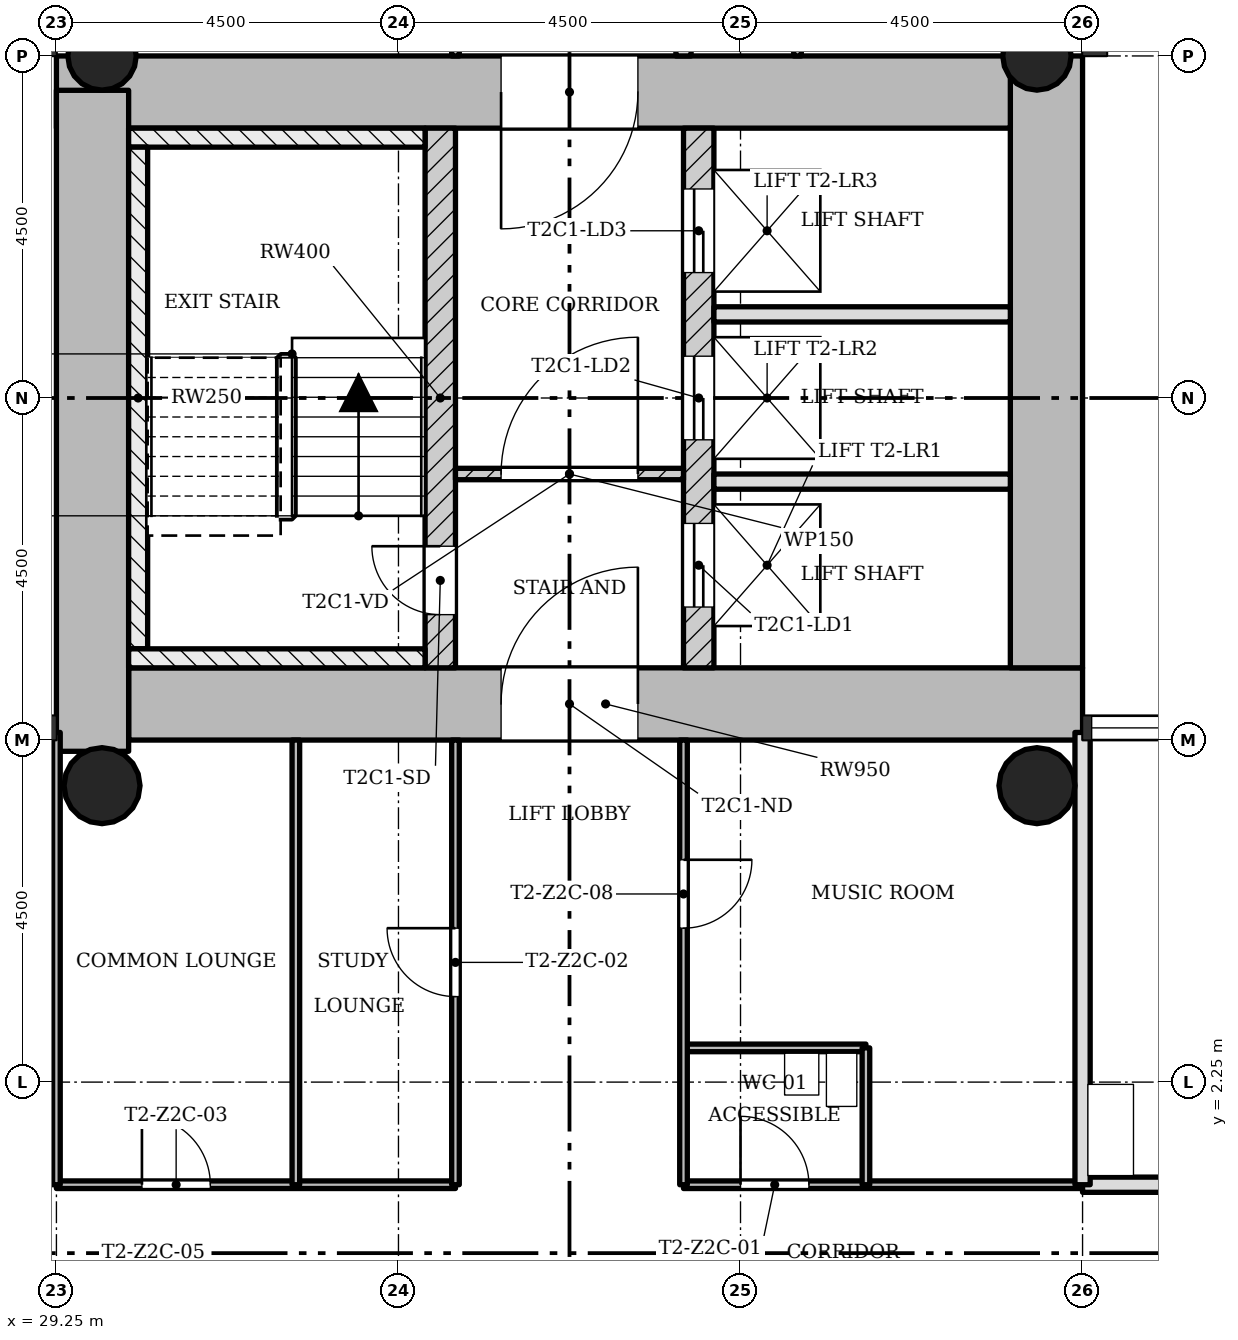
"""IFC4 building model, lengths in metres.
Left out: names, types, materials, properties, quantities, classifications, styles, units other than length and angle.
Written with IfcOpenShell. Run it as: python <this file> out.ifc"""

import sys

from ifc_helpers import new_model, si_unit, direction, frame, frame_2d, origin, origin_2d, place, context, subcontext, project, spatial, rectangle, hollow_circle, extrude, element, fill, save


model = new_model("IFC4")
c1 = context("Model", 3, precision=1e-05, world=origin(), true_north=direction((0.0, 1.0)))
c2 = subcontext(c1, "Body", "Model", "MODEL_VIEW")
j1 = project(units=[si_unit("LENGTHUNIT", "METRE"), si_unit("PLANEANGLEUNIT", "RADIAN")], contexts=[c1])
p1 = place(None, origin())
s1 = spatial("IfcSite", under=j1, at=p1, CompositionType="ELEMENT")
p2 = place(p1, origin())
s2 = spatial("IfcBuilding", under=s1, at=p2, CompositionType="ELEMENT")
p3 = place(p2, frame((0.0, 0.0, 93.6)))
s3 = spatial("IfcBuildingStorey", under=s2, at=p3, CompositionType="ELEMENT", Elevation=93.6)
p4 = place(p3, frame((30.2, 7.225, 0.0), z_axis=(0.0, 0.0, 1.0), x_axis=(1.0, 0.0, 0.0)))
e1 = element("IfcWall", 1, at=p4, inside=s3, PredefinedType="SHEAR", context=c2, shape_type="SweptSolid", body=[
    extrude(rectangle(XDim=12.55, YDim=0.95, at=frame_2d((6.275, 0.0))), origin(), (0.0, 0.0, 1.0), 3.4),
])
p5 = place(p4, frame((4.9, 0.0, 0.0)))
e2 = element("IfcOpeningElement", 2, at=p5, cuts=e1, PredefinedType="OPENING", context=c2, shape_type="SweptSolid", body=[
    extrude(rectangle(XDim=1.8, YDim=2.1, at=frame_2d((0.9, 1.05))), frame((0.0, 0.485, 0.0), z_axis=(0.0, -1.0, 0.0), x_axis=(1.0, 0.0, 0.0)), (0.0, 0.0, 1.0), 0.97),
])
p6 = place(p3, frame((42.275, 7.7, 0.0), z_axis=(0.0, 0.0, 1.0), x_axis=(0.0, 1.0, 0.0)))
e3 = element("IfcWall", 3, at=p6, inside=s3, PredefinedType="SHEAR", context=c2, shape_type="SweptSolid", body=[
    extrude(rectangle(XDim=8.05, YDim=0.95, at=frame_2d((4.025, 0.0))), origin(), (0.0, 0.0, 1.0), 3.4),
])
p7 = place(p3, frame((41.8, 15.275, 0.0), z_axis=(0.0, 0.0, 1.0), x_axis=(-1.0, 0.0, 0.0)))
e4 = element("IfcWall", 4, at=p7, inside=s3, PredefinedType="SHEAR", context=c2, shape_type="SweptSolid", body=[
    extrude(rectangle(XDim=12.55, YDim=0.95, at=frame_2d((6.275, 0.0))), origin(), (0.0, 0.0, 1.0), 3.4),
])
p8 = place(p7, frame((4.9, 0.0, 0.0)))
e5 = element("IfcOpeningElement", 5, at=p8, cuts=e4, PredefinedType="OPENING", context=c2, shape_type="SweptSolid", body=[
    extrude(rectangle(XDim=1.8, YDim=2.1, at=frame_2d((0.9, 1.05))), frame((0.0, 0.485, 0.0), z_axis=(0.0, -1.0, 0.0), x_axis=(1.0, 0.0, 0.0)), (0.0, 0.0, 1.0), 0.97),
])
p9 = place(p3, frame((29.725, 15.298, 0.0), z_axis=(0.0, 0.0, 1.0), x_axis=(0.0, -1.0, 0.0)))
e6 = element("IfcWall", 6, at=p9, inside=s3, PredefinedType="SHEAR", context=c2, shape_type="SweptSolid", body=[
    extrude(rectangle(XDim=8.696, YDim=0.95, at=frame_2d((4.348, 0.0))), origin(), (0.0, 0.0, 1.0), 3.4),
])
p10 = place(p3, frame((34.3, 7.7, 0.0), z_axis=(0.0, 0.0, 1.0), x_axis=(0.0, 1.0, 0.0)))
e7 = element("IfcWall", 7, at=p10, inside=s3, PredefinedType="SHEAR", context=c2, shape_type="SweptSolid", body=[
    extrude(rectangle(XDim=7.1, YDim=0.4, at=frame_2d((3.55, 0.0))), origin(), (0.0, 0.0, 1.0), 3.4),
])
p11 = place(p10, frame((0.7, 0.0, 0.0)))
e8 = element("IfcOpeningElement", 8, at=p11, cuts=e7, PredefinedType="OPENING", context=c2, shape_type="SweptSolid", body=[
    extrude(rectangle(XDim=0.9, YDim=2.1, at=frame_2d((0.45, 1.05))), frame((0.0, 0.21, 0.0), z_axis=(0.0, -1.0, 0.0), x_axis=(1.0, 0.0, 0.0)), (0.0, 0.0, 1.0), 0.42),
])
p12 = place(p3, frame((37.7, 7.7, 0.0), z_axis=(0.0, 0.0, 1.0), x_axis=(0.0, 1.0, 0.0)))
e9 = element("IfcWall", 9, at=p12, inside=s3, PredefinedType="SHEAR", context=c2, shape_type="SweptSolid", body=[
    extrude(rectangle(XDim=7.1, YDim=0.4, at=frame_2d((3.55, 0.0))), origin(), (0.0, 0.0, 1.0), 3.4),
])
p13 = place(p12, frame((0.8, 0.0, 0.0)))
e10 = element("IfcOpeningElement", 10, at=p13, cuts=e9, PredefinedType="OPENING", context=c2, shape_type="SweptSolid", body=[
    extrude(rectangle(XDim=1.1, YDim=2.1, at=frame_2d((0.55, 1.05))), frame((0.0, 0.21, 0.0), z_axis=(0.0, -1.0, 0.0), x_axis=(1.0, 0.0, 0.0)), (0.0, 0.0, 1.0), 0.42),
])
p14 = place(p12, frame((3.0, 0.0, 0.0)))
e11 = element("IfcOpeningElement", 11, at=p14, cuts=e9, PredefinedType="OPENING", context=c2, shape_type="SweptSolid", body=[
    extrude(rectangle(XDim=1.1, YDim=2.1, at=frame_2d((0.55, 1.05))), frame((0.0, 0.21, 0.0), z_axis=(0.0, -1.0, 0.0), x_axis=(1.0, 0.0, 0.0)), (0.0, 0.0, 1.0), 0.42),
])
p15 = place(p12, frame((5.2, 0.0, 0.0)))
e12 = element("IfcOpeningElement", 12, at=p15, cuts=e9, PredefinedType="OPENING", context=c2, shape_type="SweptSolid", body=[
    extrude(rectangle(XDim=1.1, YDim=2.1, at=frame_2d((0.55, 1.05))), frame((0.0, 0.21, 0.0), z_axis=(0.0, -1.0, 0.0), x_axis=(1.0, 0.0, 0.0)), (0.0, 0.0, 1.0), 0.42),
])
for number, where, z_axis, x_axis in (
    (13, (42.15, 15.75, 0.0), (0.0, 0.0, 1.0), (1.0, 0.0, 0.0)),
    (14, (29.85, 15.75, 0.0), (0.0, 0.0, 1.0), (1.0, 0.0, 0.0)),
):
    element("IfcColumn", number, at=place(p3, frame(where, z_axis=z_axis, x_axis=x_axis)), inside=s3, PredefinedType="COLUMN", context=c2, shape_type="SweptSolid", body=[
        extrude(hollow_circle(Radius=0.45, WallThickness=0.032, at=origin_2d()), origin(), (0.0, 0.0, 1.0), 3.4),
    ])
for number, where, z_axis, x_axis in (
    (15, (42.15, 6.15, 0.0), (0.0, 0.0, 1.0), (1.0, 0.0, 0.0)),
    (16, (29.85, 6.15, 0.0), (0.0, 0.0, 1.0), (1.0, 0.0, 0.0)),
):
    element("IfcColumn", number, at=place(p3, frame(where, z_axis=z_axis, x_axis=x_axis)), inside=s3, PredefinedType="COLUMN", context=c2, shape_type="SweptSolid", body=[
        extrude(hollow_circle(Radius=0.5, WallThickness=0.036, at=origin_2d()), origin(), (0.0, 0.0, 1.0), 3.4),
    ])
p16 = place(p3, frame((37.5, 10.25, 0.0), z_axis=(0.0, 0.0, 1.0), x_axis=(-1.0, 0.0, 0.0)))
e17 = element("IfcWall", 17, at=p16, inside=s3, PredefinedType="PARTITIONING", context=c2, shape_type="SweptSolid", body=[
    extrude(rectangle(XDim=3.0, YDim=0.15, at=frame_2d((1.5, 0.0))), origin(), (0.0, 0.0, 1.0), 3.0),
])
p17 = place(p16, frame((0.6, 0.0, 0.0)))
e18 = element("IfcOpeningElement", 18, at=p17, cuts=e17, PredefinedType="OPENING", context=c2, shape_type="SweptSolid", body=[
    extrude(rectangle(XDim=1.8, YDim=2.1, at=frame_2d((0.9, 1.05))), frame((0.0, 0.085, 0.0), z_axis=(0.0, -1.0, 0.0), x_axis=(1.0, 0.0, 0.0)), (0.0, 0.0, 1.0), 0.17),
])
for number, where, z_axis, x_axis in (
    (19, (41.8, 10.15, 0.0), (0.0, 0.0, 1.0), (-1.0, 0.0, 0.0)),
    (20, (41.8, 12.35, 0.0), (0.0, 0.0, 1.0), (-1.0, 0.0, 0.0)),
):
    element("IfcWall", number, at=place(p3, frame(where, z_axis=z_axis, x_axis=x_axis)), inside=s3, PredefinedType="SOLIDWALL", context=c2, shape_type="SweptSolid", body=[
        extrude(rectangle(XDim=3.9, YDim=0.2, at=frame_2d((1.95, 0.0))), origin(), (0.0, 0.0, 1.0), 3.0),
    ])
p18 = place(p3, frame((42.75, 0.9, 0.0), z_axis=(0.0, 0.0, 1.0), x_axis=(-1.0, 0.0, 0.0)))
e21 = element("IfcWall", 21, at=p18, inside=s3, PredefinedType="PARTITIONING", context=c2, shape_type="SweptSolid", body=[
    extrude(rectangle(XDim=5.25, YDim=0.1, at=frame_2d((2.625, 0.0))), origin(), (0.0, 0.0, 1.0), 3.0),
])
p19 = place(p18, frame((3.6, 0.0, 0.0)))
e22 = element("IfcOpeningElement", 22, at=p19, cuts=e21, PredefinedType="OPENING", context=c2, shape_type="SweptSolid", body=[
    extrude(rectangle(XDim=0.9, YDim=2.1, at=frame_2d((0.45, 1.05))), frame((0.0, 0.06, 0.0), z_axis=(0.0, -1.0, 0.0), x_axis=(1.0, 0.0, 0.0)), (0.0, 0.0, 1.0), 0.12),
])
p20 = place(p3, frame((34.5, 0.9, 0.0), z_axis=(0.0, 0.0, 1.0), x_axis=(-1.0, 0.0, 0.0)))
e23 = element("IfcWall", 23, at=p20, inside=s3, PredefinedType="PARTITIONING", context=c2, shape_type="SweptSolid", body=[
    extrude(rectangle(XDim=5.25, YDim=0.1, at=frame_2d((2.625, 0.0))), origin(), (0.0, 0.0, 1.0), 3.0),
])
p21 = place(p20, frame((3.225, 0.0, 0.0)))
e24 = element("IfcOpeningElement", 24, at=p21, cuts=e23, PredefinedType="OPENING", context=c2, shape_type="SweptSolid", body=[
    extrude(rectangle(XDim=0.9, YDim=2.1, at=frame_2d((0.45, 1.05))), frame((0.0, 0.06, 0.0), z_axis=(0.0, -1.0, 0.0), x_axis=(1.0, 0.0, 0.0)), (0.0, 0.0, 1.0), 0.12),
])
p22 = place(p3, frame((51.75, 0.9, 0.0), z_axis=(0.0, 0.0, 1.0), x_axis=(-1.0, 0.0, 0.0)))
e25 = element("IfcWall", 25, at=p22, inside=s3, PredefinedType="SOLIDWALL", context=c2, shape_type="SweptSolid", body=[
    extrude(rectangle(XDim=9.0, YDim=0.2, at=frame_2d((4.5, 0.0))), origin(), (0.0, 0.0, 1.0), 3.0),
])
p23 = place(p22, frame((1.95, 0.0, 0.0)))
e26 = element("IfcOpeningElement", 26, at=p23, cuts=e25, PredefinedType="OPENING", context=c2, shape_type="SweptSolid", body=[
    extrude(rectangle(XDim=0.9, YDim=2.1, at=frame_2d((0.45, 1.05))), frame((0.0, 0.11, 0.0), z_axis=(0.0, -1.0, 0.0), x_axis=(1.0, 0.0, 0.0)), (0.0, 0.0, 1.0), 0.22),
])
p24 = place(p3, frame((39.9, 2.7, 0.0), z_axis=(0.0, 0.0, 1.0), x_axis=(-1.0, 0.0, 0.0)))
e27 = element("IfcWall", 27, at=p24, inside=s3, PredefinedType="PARTITIONING", context=c2, shape_type="SweptSolid", body=[
    extrude(rectangle(XDim=2.4, YDim=0.1, at=frame_2d((1.2, 0.0))), origin(), (0.0, 0.0, 1.0), 3.0),
])
p25 = place(p3, frame((29.25, 3.15, 0.0), z_axis=(0.0, 0.0, 1.0), x_axis=(-1.0, 0.0, 0.0)))
e28 = element("IfcWall", 28, at=p25, inside=s3, PredefinedType="PARTITIONING", context=c2, shape_type="SweptSolid", body=[
    extrude(rectangle(XDim=9.0, YDim=0.1, at=frame_2d((4.5, 0.0))), origin(), (0.0, 0.0, 1.0), 3.0),
])
p26 = place(p25, frame((2.55, 0.0, 0.0)))
e29 = element("IfcOpeningElement", 29, at=p26, cuts=e28, PredefinedType="OPENING", context=c2, shape_type="SweptSolid", body=[
    extrude(rectangle(XDim=0.9, YDim=2.1, at=frame_2d((0.45, 1.05))), frame((0.0, 0.06, 0.0), z_axis=(0.0, -1.0, 0.0), x_axis=(1.0, 0.0, 0.0)), (0.0, 0.0, 1.0), 0.12),
])
p27 = place(p3, frame((42.75, 0.9, 0.0), z_axis=(0.0, 0.0, 1.0), x_axis=(0.0, 1.0, 0.0)))
e30 = element("IfcWall", 30, at=p27, inside=s3, PredefinedType="SOLIDWALL", context=c2, shape_type="SweptSolid", body=[
    extrude(rectangle(XDim=5.95, YDim=0.2, at=frame_2d((2.975, 0.0))), origin(), (0.0, 0.0, 1.0), 3.0),
])
p28 = place(p3, frame((39.9, 0.9, 0.0), z_axis=(0.0, 0.0, 1.0), x_axis=(0.0, 1.0, 0.0)))
e31 = element("IfcWall", 31, at=p28, inside=s3, PredefinedType="PARTITIONING", context=c2, shape_type="SweptSolid", body=[
    extrude(rectangle(XDim=1.8, YDim=0.1, at=frame_2d((0.9, 0.0))), origin(), (0.0, 0.0, 1.0), 3.0),
])
p29 = place(p3, frame((39.0, 15.75, 0.0), z_axis=(0.0, 0.0, 1.0), x_axis=(0.0, 1.0, 0.0)))
e32 = element("IfcWall", 32, at=p29, inside=s3, PredefinedType="PARTITIONING", context=c2, shape_type="SweptSolid", body=[
    extrude(rectangle(XDim=2.4, YDim=0.1, at=frame_2d((1.2, 0.0))), origin(), (0.0, 0.0, 1.0), 3.0),
])
p30 = place(p29, frame((0.75, 0.0, 0.0)))
e33 = element("IfcOpeningElement", 33, at=p30, cuts=e32, PredefinedType="OPENING", context=c2, shape_type="SweptSolid", body=[
    extrude(rectangle(XDim=0.9, YDim=2.1, at=frame_2d((0.45, 1.05))), frame((0.0, 0.06, 0.0), z_axis=(0.0, -1.0, 0.0), x_axis=(1.0, 0.0, 0.0)), (0.0, 0.0, 1.0), 0.12),
])
p31 = place(p3, frame((37.5, 0.9, 0.0), z_axis=(0.0, 0.0, 1.0), x_axis=(0.0, 1.0, 0.0)))
e34 = element("IfcWall", 34, at=p31, inside=s3, PredefinedType="PARTITIONING", context=c2, shape_type="SweptSolid", body=[
    extrude(rectangle(XDim=5.85, YDim=0.1, at=frame_2d((2.925, 0.0))), origin(), (0.0, 0.0, 1.0), 3.0),
])
p32 = place(p31, frame((3.375, 0.0, 0.0)))
e35 = element("IfcOpeningElement", 35, at=p32, cuts=e34, PredefinedType="OPENING", context=c2, shape_type="SweptSolid", body=[
    extrude(rectangle(XDim=0.9, YDim=2.1, at=frame_2d((0.45, 1.05))), frame((0.0, 0.06, 0.0), z_axis=(0.0, -1.0, 0.0), x_axis=(1.0, 0.0, 0.0)), (0.0, 0.0, 1.0), 0.12),
])
p33 = place(p3, frame((37.5, 15.75, 0.0), z_axis=(0.0, 0.0, 1.0), x_axis=(0.0, 1.0, 0.0)))
e36 = element("IfcWall", 36, at=p33, inside=s3, PredefinedType="SOLIDWALL", context=c2, shape_type="SweptSolid", body=[
    extrude(rectangle(XDim=4.5, YDim=0.2, at=frame_2d((2.25, 0.0))), origin(), (0.0, 0.0, 1.0), 3.0),
])
p34 = place(p33, frame((3.0, 0.0, 0.0)))
e37 = element("IfcOpeningElement", 37, at=p34, cuts=e36, PredefinedType="OPENING", context=c2, shape_type="SweptSolid", body=[
    extrude(rectangle(XDim=0.9, YDim=2.1, at=frame_2d((0.45, 1.05))), frame((0.0, 0.11, 0.0), z_axis=(0.0, -1.0, 0.0), x_axis=(1.0, 0.0, 0.0)), (0.0, 0.0, 1.0), 0.22),
])
p35 = place(p3, frame((34.5, 0.9, 0.0), z_axis=(0.0, 0.0, 1.0), x_axis=(0.0, 1.0, 0.0)))
e38 = element("IfcWall", 38, at=p35, inside=s3, PredefinedType="PARTITIONING", context=c2, shape_type="SweptSolid", body=[
    extrude(rectangle(XDim=5.85, YDim=0.1, at=frame_2d((2.925, 0.0))), origin(), (0.0, 0.0, 1.0), 3.0),
])
p36 = place(p35, frame((2.475, 0.0, 0.0)))
e39 = element("IfcOpeningElement", 39, at=p36, cuts=e38, PredefinedType="OPENING", context=c2, shape_type="SweptSolid", body=[
    extrude(rectangle(XDim=0.9, YDim=2.1, at=frame_2d((0.45, 1.05))), frame((0.0, 0.06, 0.0), z_axis=(0.0, -1.0, 0.0), x_axis=(1.0, 0.0, 0.0)), (0.0, 0.0, 1.0), 0.12),
])
p37 = place(p3, frame((34.5, 15.75, 0.0), z_axis=(0.0, 0.0, 1.0), x_axis=(0.0, 1.0, 0.0)))
e40 = element("IfcWall", 40, at=p37, inside=s3, PredefinedType="PARTITIONING", context=c2, shape_type="SweptSolid", body=[
    extrude(rectangle(XDim=4.5, YDim=0.1, at=frame_2d((2.25, 0.0))), origin(), (0.0, 0.0, 1.0), 3.0),
])
p38 = place(p37, frame((1.8, 0.0, 0.0)))
e41 = element("IfcOpeningElement", 41, at=p38, cuts=e40, PredefinedType="OPENING", context=c2, shape_type="SweptSolid", body=[
    extrude(rectangle(XDim=0.9, YDim=2.1, at=frame_2d((0.45, 1.05))), frame((0.0, 0.06, 0.0), z_axis=(0.0, -1.0, 0.0), x_axis=(1.0, 0.0, 0.0)), (0.0, 0.0, 1.0), 0.12),
])
p39 = place(p3, frame((32.4, 0.9, 0.0), z_axis=(0.0, 0.0, 1.0), x_axis=(0.0, 1.0, 0.0)))
e42 = element("IfcWall", 42, at=p39, inside=s3, PredefinedType="PARTITIONING", context=c2, shape_type="SweptSolid", body=[
    extrude(rectangle(XDim=5.85, YDim=0.1, at=frame_2d((2.925, 0.0))), origin(), (0.0, 0.0, 1.0), 3.0),
])
p40 = place(p3, frame((29.25, 0.9, 0.0), z_axis=(0.0, 0.0, 1.0), x_axis=(0.0, 1.0, 0.0)))
e43 = element("IfcWall", 43, at=p40, inside=s3, PredefinedType="PARTITIONING", context=c2, shape_type="SweptSolid", body=[
    extrude(rectangle(XDim=5.95, YDim=0.1, at=frame_2d((2.975, 0.0))), origin(), (0.0, 0.0, 1.0), 3.0),
])
p41 = place(p3, frame((34.1, 14.675, 0.0), z_axis=(0.0, 0.0, 1.0), x_axis=(-1.0, 0.0, 0.0)))
e44 = element("IfcWall", 44, at=p41, inside=s3, PredefinedType="SHEAR", context=c2, shape_type="SweptSolid", body=[
    extrude(rectangle(XDim=3.9, YDim=0.25, at=frame_2d((1.95, 0.0))), origin(), (0.0, 0.0, 1.0), 3.4),
])
p42 = place(p3, frame((30.325, 7.95, 0.0), z_axis=(0.0, 0.0, 1.0), x_axis=(0.0, 1.0, 0.0)))
e45 = element("IfcWall", 45, at=p42, inside=s3, PredefinedType="SHEAR", context=c2, shape_type="SweptSolid", body=[
    extrude(rectangle(XDim=6.6, YDim=0.25, at=frame_2d((3.3, 0.0))), origin(), (0.0, 0.0, 1.0), 3.4),
])
p43 = place(p3, frame((34.1, 7.825, 0.0), z_axis=(0.0, 0.0, 1.0), x_axis=(-1.0, 0.0, 0.0)))
e46 = element("IfcWall", 46, at=p43, inside=s3, PredefinedType="SHEAR", context=c2, shape_type="SweptSolid", body=[
    extrude(rectangle(XDim=3.9, YDim=0.25, at=frame_2d((1.95, 0.0))), origin(), (0.0, 0.0, 1.0), 3.4),
])
p44 = place(p17, origin())
e47 = element("IfcDoor", 47, at=p44, inside=s3, OperationType="SINGLE_SWING_LEFT", PredefinedType="DOOR", context=c2, shape_type="SweptSolid", body=[
    extrude(rectangle(XDim=1.8, YDim=2.1, at=frame_2d((0.9, 1.05))), frame((0.0, 0.025, 0.0), z_axis=(0.0, -1.0, 0.0), x_axis=(1.0, 0.0, 0.0)), (0.0, 0.0, 1.0), 0.05),
])
fill(e18, e47)
p45 = place(p19, origin())
e48 = element("IfcDoor", 48, at=p45, inside=s3, OperationType="SINGLE_SWING_RIGHT", PredefinedType="DOOR", context=c2, shape_type="SweptSolid", body=[
    extrude(rectangle(XDim=0.9, YDim=2.1, at=frame_2d((0.45, 1.05))), frame((0.0, 0.025, 0.0), z_axis=(0.0, -1.0, 0.0), x_axis=(1.0, 0.0, 0.0)), (0.0, 0.0, 1.0), 0.05),
])
fill(e22, e48)
p46 = place(p36, origin())
e49 = element("IfcDoor", 49, at=p46, inside=s3, OperationType="SINGLE_SWING_LEFT", PredefinedType="DOOR", context=c2, shape_type="SweptSolid", body=[
    extrude(rectangle(XDim=0.9, YDim=2.1, at=frame_2d((0.45, 1.05))), frame((0.0, 0.025, 0.0), z_axis=(0.0, -1.0, 0.0), x_axis=(1.0, 0.0, 0.0)), (0.0, 0.0, 1.0), 0.05),
])
fill(e39, e49)
p47 = place(p21, origin())
e50 = element("IfcDoor", 50, at=p47, inside=s3, OperationType="SINGLE_SWING_RIGHT", PredefinedType="DOOR", context=c2, shape_type="SweptSolid", body=[
    extrude(rectangle(XDim=0.9, YDim=2.1, at=frame_2d((0.45, 1.05))), frame((0.0, 0.025, 0.0), z_axis=(0.0, -1.0, 0.0), x_axis=(1.0, 0.0, 0.0)), (0.0, 0.0, 1.0), 0.05),
])
fill(e24, e50)
p48 = place(p32, origin())
e51 = element("IfcDoor", 51, at=p48, inside=s3, OperationType="SINGLE_SWING_RIGHT", PredefinedType="DOOR", context=c2, shape_type="SweptSolid", body=[
    extrude(rectangle(XDim=0.9, YDim=2.1, at=frame_2d((0.45, 1.05))), frame((0.0, 0.025, 0.0), z_axis=(0.0, -1.0, 0.0), x_axis=(1.0, 0.0, 0.0)), (0.0, 0.0, 1.0), 0.05),
])
fill(e35, e51)
p49 = place(p11, origin())
e52 = element("IfcDoor", 52, at=p49, inside=s3, OperationType="SINGLE_SWING_LEFT", PredefinedType="DOOR", context=c2, shape_type="SweptSolid", body=[
    extrude(rectangle(XDim=0.9, YDim=2.1, at=frame_2d((0.45, 1.05))), frame((0.0, 0.025, 0.0), z_axis=(0.0, -1.0, 0.0), x_axis=(1.0, 0.0, 0.0)), (0.0, 0.0, 1.0), 0.05),
])
fill(e8, e52)
p50 = place(p13, origin())
e53 = element("IfcDoor", 53, at=p50, inside=s3, OperationType="SLIDING_TO_LEFT", PredefinedType="DOOR", context=c2, shape_type="SweptSolid", body=[
    extrude(rectangle(XDim=1.1, YDim=2.1, at=frame_2d((0.55, 1.05))), frame((0.0, 0.025, 0.0), z_axis=(0.0, -1.0, 0.0), x_axis=(1.0, 0.0, 0.0)), (0.0, 0.0, 1.0), 0.05),
])
fill(e10, e53)
p51 = place(p14, origin())
e54 = element("IfcDoor", 54, at=p51, inside=s3, OperationType="SLIDING_TO_LEFT", PredefinedType="DOOR", context=c2, shape_type="SweptSolid", body=[
    extrude(rectangle(XDim=1.1, YDim=2.1, at=frame_2d((0.55, 1.05))), frame((0.0, 0.025, 0.0), z_axis=(0.0, -1.0, 0.0), x_axis=(1.0, 0.0, 0.0)), (0.0, 0.0, 1.0), 0.05),
])
fill(e11, e54)
p52 = place(p15, origin())
e55 = element("IfcDoor", 55, at=p52, inside=s3, OperationType="SLIDING_TO_LEFT", PredefinedType="DOOR", context=c2, shape_type="SweptSolid", body=[
    extrude(rectangle(XDim=1.1, YDim=2.1, at=frame_2d((0.55, 1.05))), frame((0.0, 0.025, 0.0), z_axis=(0.0, -1.0, 0.0), x_axis=(1.0, 0.0, 0.0)), (0.0, 0.0, 1.0), 0.05),
])
fill(e12, e55)
p53 = place(p5, origin())
e56 = element("IfcDoor", 56, at=p53, inside=s3, OperationType="SINGLE_SWING_LEFT", PredefinedType="DOOR", context=c2, shape_type="SweptSolid", body=[
    extrude(rectangle(XDim=1.8, YDim=2.1, at=frame_2d((0.9, 1.05))), frame((0.0, 0.025, 0.0), z_axis=(0.0, -1.0, 0.0), x_axis=(1.0, 0.0, 0.0)), (0.0, 0.0, 1.0), 0.05),
])
fill(e2, e56)
p54 = place(p8, origin())
e57 = element("IfcDoor", 57, at=p54, inside=s3, OperationType="SINGLE_SWING_LEFT", PredefinedType="DOOR", context=c2, shape_type="SweptSolid", body=[
    extrude(rectangle(XDim=1.8, YDim=2.1, at=frame_2d((0.9, 1.05))), frame((0.0, 0.025, 0.0), z_axis=(0.0, -1.0, 0.0), x_axis=(1.0, 0.0, 0.0)), (0.0, 0.0, 1.0), 0.05),
])
fill(e5, e57)
save(model, sys.argv[1])
